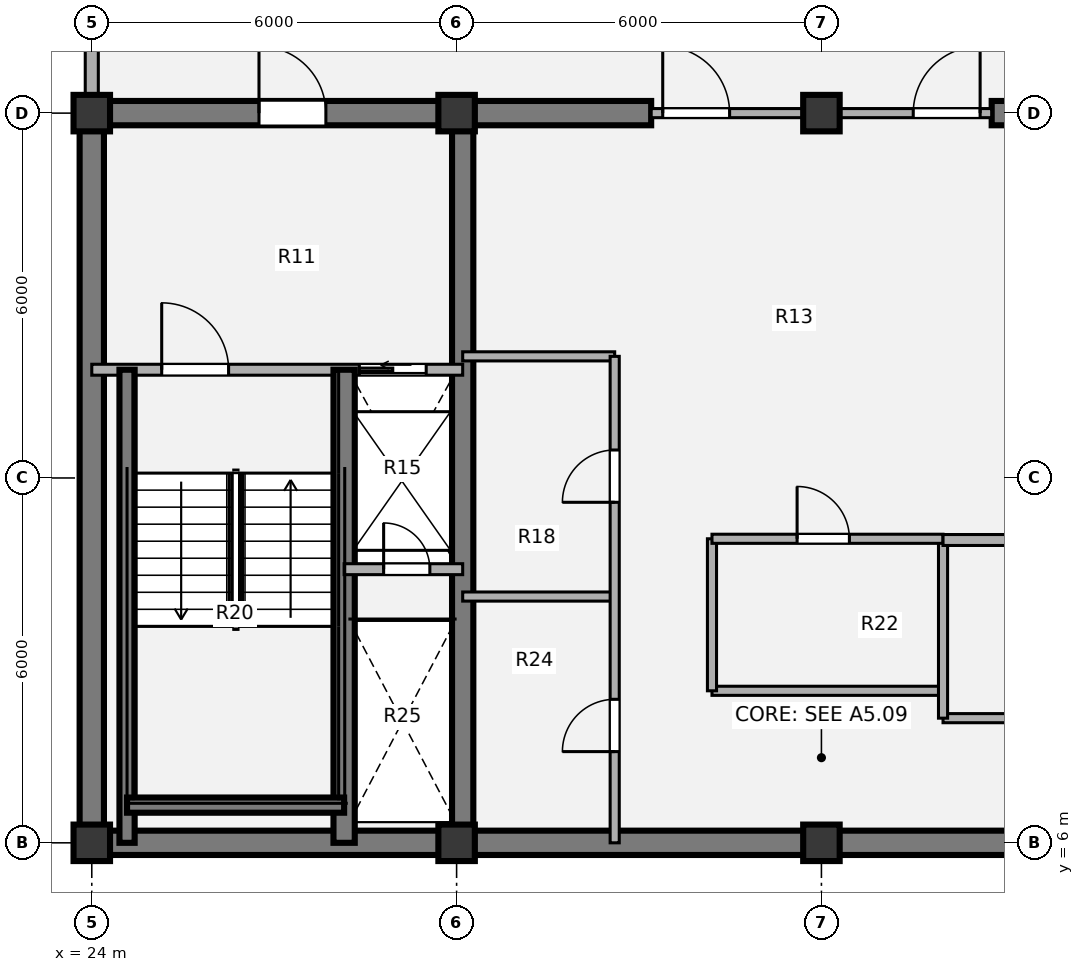
"""IFC4 building model, lengths in metres.
Left out: names, types, materials, properties, quantities, classifications, styles, units other than length and angle.
Written with IfcOpenShell. Run it as: python <this file> out.ifc"""

import sys

from ifc_helpers import new_model, si_unit, direction, frame, frame_2d, origin, origin_2d, place, context, subcontext, project, spatial, rectangle, extrude, source, transform, mapped, element, fill, save


model = new_model("IFC4")
c1 = context("Model", 3, precision=1e-05, world=origin(), true_north=direction((0.0, 1.0)))
c2 = subcontext(c1, "Body", "Model", "MODEL_VIEW")
j1 = project(units=[si_unit("LENGTHUNIT", "METRE"), si_unit("PLANEANGLEUNIT", "RADIAN")], contexts=[c1])
p1 = place(None, origin())
s1 = spatial("IfcSite", under=j1, at=p1, CompositionType="ELEMENT")
p2 = place(p1, origin())
s2 = spatial("IfcBuilding", under=s1, at=p2, CompositionType="ELEMENT")
p3 = place(p2, frame((0.0, 0.0, 257.04)))
s3 = spatial("IfcBuildingStorey", under=s2, at=p3, CompositionType="ELEMENT", Elevation=257.04)
m1 = source(origin(), c2, "Body", "SweptSolid", [
    extrude(rectangle(XDim=0.6, YDim=0.6, at=origin_2d()), origin(), (0.0, 0.0, 1.0), 3.78),
])
for number, where, z_axis, x_axis in (
    (1, (24.0, 6.0, 0.0), (0.0, 0.0, 1.0), (1.0, 0.0, 0.0)),
    (2, (30.0, 6.0, 0.0), (0.0, 0.0, 1.0), (1.0, 0.0, 0.0)),
    (3, (36.0, 6.0, 0.0), (0.0, 0.0, 1.0), (1.0, 0.0, 0.0)),
    (4, (24.0, 18.0, 0.0), (0.0, 0.0, 1.0), (1.0, 0.0, 0.0)),
    (5, (30.0, 18.0, 0.0), (0.0, 0.0, 1.0), (1.0, 0.0, 0.0)),
    (6, (36.0, 18.0, 0.0), (0.0, 0.0, 1.0), (1.0, 0.0, 0.0)),
):
    element("IfcColumn", number, at=place(p3, frame(where, z_axis=z_axis, x_axis=x_axis)), inside=s3, PredefinedType="COLUMN", context=c2, shape_type="MappedRepresentation", body=[
        mapped(m1, transform((0.0, 0.0, 0.0), x_axis=(1.0, 0.0, 0.0), y_axis=(0.0, 1.0, 0.0), z_axis=(0.0, 0.0, 1.0), scale=1.0)),
    ])
p4 = place(p3, frame((48.2, 6.0, 0.0), z_axis=(0.0, 0.0, 1.0), x_axis=(-1.0, 0.0, 0.0)))
e7 = element("IfcWall", 7, at=p4, inside=s3, PredefinedType="SHEAR", context=c2, shape_type="SweptSolid", body=[
    extrude(rectangle(XDim=24.4, YDim=0.4, at=frame_2d((12.2, 0.0))), origin(), (0.0, 0.0, 1.0), 3.78),
])
p5 = place(p3, frame((24.0, 6.0, 0.0), z_axis=(0.0, 0.0, 1.0), x_axis=(0.0, 1.0, 0.0)))
e8 = element("IfcWall", 8, at=p5, inside=s3, PredefinedType="SHEAR", context=c2, shape_type="SweptSolid", body=[
    extrude(rectangle(XDim=12.0, YDim=0.4, at=frame_2d((6.0, 0.0))), origin(), (0.0, 0.0, 1.0), 3.78),
])
p6 = place(p3, frame((23.8, 18.0, 0.0), z_axis=(0.0, 0.0, 1.0), x_axis=(1.0, 0.0, 0.0)))
e9 = element("IfcWall", 9, at=p6, inside=s3, PredefinedType="SHEAR", context=c2, shape_type="SweptSolid", body=[
    extrude(rectangle(XDim=9.4, YDim=0.4, at=frame_2d((4.7, 0.0))), origin(), (0.0, 0.0, 1.0), 3.78),
])
p7 = place(p6, frame((2.95, 0.0, 0.0)))
e10 = element("IfcOpeningElement", 10, at=p7, cuts=e9, PredefinedType="OPENING", context=c2, shape_type="SweptSolid", body=[
    extrude(rectangle(XDim=1.1, YDim=2.1, at=origin_2d()), frame((0.55, 0.21, 1.05), z_axis=(0.0, -1.0, 0.0), x_axis=(1.0, 0.0, 0.0)), (0.0, 0.0, 1.0), 0.42),
])
p8 = place(p3, frame((38.8, 18.0, 0.0), z_axis=(0.0, 0.0, 1.0), x_axis=(1.0, 0.0, 0.0)))
e11 = element("IfcWall", 11, at=p8, inside=s3, PredefinedType="SHEAR", context=c2, shape_type="SweptSolid", body=[
    extrude(rectangle(XDim=9.4, YDim=0.4, at=frame_2d((4.7, 0.0))), origin(), (0.0, 0.0, 1.0), 3.78),
])
p9 = place(p8, frame((5.45, 0.0, 0.0)))
e12 = element("IfcOpeningElement", 12, at=p9, cuts=e11, PredefinedType="OPENING", context=c2, shape_type="SweptSolid", body=[
    extrude(rectangle(XDim=1.1, YDim=2.1, at=origin_2d()), frame((0.55, 0.21, 1.05), z_axis=(0.0, -1.0, 0.0), x_axis=(1.0, 0.0, 0.0)), (0.0, 0.0, 1.0), 0.42),
])
p10 = place(p3, frame((30.1, 6.0, 0.0), z_axis=(0.0, 0.0, 1.0), x_axis=(0.0, 1.0, 0.0)))
e13 = element("IfcWall", 13, at=p10, inside=s3, PredefinedType="SHEAR", context=c2, shape_type="SweptSolid", body=[
    extrude(rectangle(XDim=12.0, YDim=0.35, at=frame_2d((6.0, 0.0))), origin(), (0.0, 0.0, 1.0), 3.78),
])
p11 = place(p3, frame((24.0, 18.28, 0.0), z_axis=(0.0, 0.0, 1.0), x_axis=(0.0, 1.0, 0.0)))
e14 = element("IfcWall", 14, at=p11, inside=s3, PredefinedType="SOLIDWALL", context=c2, shape_type="SweptSolid", body=[
    extrude(rectangle(XDim=2.77, YDim=0.215, at=frame_2d((1.385, 0.0))), origin(), (0.0, 0.0, 1.0), 2.718),
])
p12 = place(p3, frame((30.1, 14.0, 0.0), z_axis=(0.0, 0.0, 1.0), x_axis=(1.0, 0.0, 0.0)))
e15 = element("IfcWall", 15, at=p12, inside=s3, PredefinedType="PARTITIONING", context=c2, shape_type="SweptSolid", body=[
    extrude(rectangle(XDim=2.5, YDim=0.15, at=frame_2d((1.25, 0.0))), origin(), (0.0, 0.0, 1.0), 3.5),
])
p13 = place(p3, frame((34.2, 8.5, 0.0), z_axis=(0.0, 0.0, 1.0), x_axis=(1.0, 0.0, 0.0)))
e16 = element("IfcWall", 16, at=p13, inside=s3, PredefinedType="PARTITIONING", context=c2, shape_type="SweptSolid", body=[
    extrude(rectangle(XDim=3.8, YDim=0.15, at=frame_2d((1.9, 0.0))), origin(), (0.0, 0.0, 1.0), 3.5),
])
p14 = place(p3, frame((38.0, 8.05, 0.0), z_axis=(0.0, 0.0, 1.0), x_axis=(1.0, 0.0, 0.0)))
e17 = element("IfcWall", 17, at=p14, inside=s3, PredefinedType="PARTITIONING", context=c2, shape_type="SweptSolid", body=[
    extrude(rectangle(XDim=3.9, YDim=0.15, at=frame_2d((1.95, 0.0))), origin(), (0.0, 0.0, 1.0), 3.5),
])
p15 = place(p14, frame((1.45, 0.0, 0.0)))
e18 = element("IfcOpeningElement", 18, at=p15, cuts=e17, PredefinedType="OPENING", context=c2, shape_type="SweptSolid", body=[
    extrude(rectangle(XDim=0.86, YDim=2.1, at=origin_2d()), frame((0.43, 0.085, 1.05), z_axis=(0.0, -1.0, 0.0), x_axis=(1.0, 0.0, 0.0)), (0.0, 0.0, 1.0), 0.17),
])
p16 = place(p3, frame((34.2, 8.5, 0.0), z_axis=(0.0, 0.0, 1.0), x_axis=(0.0, 1.0, 0.0)))
e19 = element("IfcWall", 19, at=p16, inside=s3, PredefinedType="PARTITIONING", context=c2, shape_type="SweptSolid", body=[
    extrude(rectangle(XDim=2.5, YDim=0.15, at=frame_2d((1.25, 0.0))), origin(), (0.0, 0.0, 1.0), 3.5),
])
p17 = place(p3, frame((38.0, 8.05, 0.0), z_axis=(0.0, 0.0, 1.0), x_axis=(0.0, 1.0, 0.0)))
e20 = element("IfcWall", 20, at=p17, inside=s3, PredefinedType="PARTITIONING", context=c2, shape_type="SweptSolid", body=[
    extrude(rectangle(XDim=2.95, YDim=0.15, at=frame_2d((1.475, 0.0))), origin(), (0.0, 0.0, 1.0), 3.5),
])
p18 = place(p3, frame((34.2, 11.0, 0.0), z_axis=(0.0, 0.0, 1.0), x_axis=(1.0, 0.0, 0.0)))
e21 = element("IfcWall", 21, at=p18, inside=s3, PredefinedType="PARTITIONING", context=c2, shape_type="SweptSolid", body=[
    extrude(rectangle(XDim=3.8, YDim=0.15, at=frame_2d((1.9, 0.0))), origin(), (0.0, 0.0, 1.0), 3.5),
])
p19 = place(p18, frame((1.4, 0.0, 0.0)))
e22 = element("IfcOpeningElement", 22, at=p19, cuts=e21, PredefinedType="OPENING", context=c2, shape_type="SweptSolid", body=[
    extrude(rectangle(XDim=0.86, YDim=2.1, at=origin_2d()), frame((0.43, 0.085, 1.05), z_axis=(0.0, -1.0, 0.0), x_axis=(1.0, 0.0, 0.0)), (0.0, 0.0, 1.0), 0.17),
])
p20 = place(p3, frame((38.0, 10.98, 0.0), z_axis=(0.0, 0.0, 1.0), x_axis=(1.0, 0.0, 0.0)))
e23 = element("IfcWall", 23, at=p20, inside=s3, PredefinedType="PARTITIONING", context=c2, shape_type="SweptSolid", body=[
    extrude(rectangle(XDim=3.9, YDim=0.18, at=frame_2d((1.95, 0.0))), origin(), (0.0, 0.0, 1.0), 3.5),
])
p21 = place(p3, frame((30.1, 10.05, 0.0), z_axis=(0.0, 0.0, 1.0), x_axis=(1.0, 0.0, 0.0)))
e24 = element("IfcWall", 24, at=p21, inside=s3, PredefinedType="PARTITIONING", context=c2, shape_type="SweptSolid", body=[
    extrude(rectangle(XDim=2.5, YDim=0.15, at=frame_2d((1.25, 0.0))), origin(), (0.0, 0.0, 1.0), 3.5),
])
p22 = place(p3, frame((32.6, 6.0, 0.0), z_axis=(0.0, 0.0, 1.0), x_axis=(0.0, 1.0, 0.0)))
e25 = element("IfcWall", 25, at=p22, inside=s3, PredefinedType="PARTITIONING", context=c2, shape_type="SweptSolid", body=[
    extrude(rectangle(XDim=8.0, YDim=0.15, at=frame_2d((4.0, 0.0))), origin(), (0.0, 0.0, 1.0), 3.5),
])
p23 = place(p22, frame((1.5, 0.0, 0.0)))
e26 = element("IfcOpeningElement", 26, at=p23, cuts=e25, PredefinedType="OPENING", context=c2, shape_type="SweptSolid", body=[
    extrude(rectangle(XDim=0.86, YDim=2.1, at=origin_2d()), frame((0.43, 0.085, 1.05), z_axis=(0.0, -1.0, 0.0), x_axis=(1.0, 0.0, 0.0)), (0.0, 0.0, 1.0), 0.17),
])
p24 = place(p22, frame((5.6, 0.0, 0.0)))
e27 = element("IfcOpeningElement", 27, at=p24, cuts=e25, PredefinedType="OPENING", context=c2, shape_type="SweptSolid", body=[
    extrude(rectangle(XDim=0.86, YDim=2.1, at=origin_2d()), frame((0.43, 0.085, 1.05), z_axis=(0.0, -1.0, 0.0), x_axis=(1.0, 0.0, 0.0)), (0.0, 0.0, 1.0), 0.17),
])
p25 = place(p3, frame((33.2, 18.0, 0.0), z_axis=(0.0, 0.0, 1.0), x_axis=(1.0, 0.0, 0.0)))
e28 = element("IfcWall", 28, at=p25, inside=s3, PredefinedType="PARTITIONING", context=c2, shape_type="SweptSolid", body=[
    extrude(rectangle(XDim=5.6, YDim=0.15, at=frame_2d((2.8, 0.0))), origin(), (0.0, 0.0, 1.0), 2.515),
])
p26 = place(p25, frame((0.19, 0.0, 0.0)))
e29 = element("IfcOpeningElement", 29, at=p26, cuts=e28, PredefinedType="OPENING", context=c2, shape_type="SweptSolid", body=[
    extrude(rectangle(XDim=1.1, YDim=2.1, at=origin_2d()), frame((0.55, 0.085, 1.05), z_axis=(0.0, -1.0, 0.0), x_axis=(1.0, 0.0, 0.0)), (0.0, 0.0, 1.0), 0.17),
])
p27 = place(p25, frame((4.31, 0.0, 0.0)))
e30 = element("IfcOpeningElement", 30, at=p27, cuts=e28, PredefinedType="OPENING", context=c2, shape_type="SweptSolid", body=[
    extrude(rectangle(XDim=1.1, YDim=2.1, at=origin_2d()), frame((0.55, 0.085, 1.05), z_axis=(0.0, -1.0, 0.0), x_axis=(1.0, 0.0, 0.0)), (0.0, 0.0, 1.0), 0.17),
])
p28 = place(p3, frame((24.0, 13.78, 0.0), z_axis=(0.0, 0.0, 1.0), x_axis=(1.0, 0.0, 0.0)))
e31 = element("IfcWall", 31, at=p28, inside=s3, PredefinedType="PARTITIONING", context=c2, shape_type="SweptSolid", body=[
    extrude(rectangle(XDim=6.1, YDim=0.18, at=frame_2d((3.05, 0.0))), origin(), (0.0, 0.0, 1.0), 3.5),
])
p29 = place(p28, frame((1.15, 0.0, 0.0)))
e32 = element("IfcOpeningElement", 32, at=p29, cuts=e31, PredefinedType="OPENING", context=c2, shape_type="SweptSolid", body=[
    extrude(rectangle(XDim=1.1, YDim=2.1, at=origin_2d()), frame((0.55, 0.1, 1.05), z_axis=(0.0, -1.0, 0.0), x_axis=(1.0, 0.0, 0.0)), (0.0, 0.0, 1.0), 0.2),
])
p30 = place(p28, frame((4.4, 0.0, 0.0)))
e33 = element("IfcOpeningElement", 33, at=p30, cuts=e31, PredefinedType="OPENING", context=c2, shape_type="SweptSolid", body=[
    extrude(rectangle(XDim=1.1, YDim=2.1, at=origin_2d()), frame((0.55, 0.1, 1.05), z_axis=(0.0, -1.0, 0.0), x_axis=(1.0, 0.0, 0.0)), (0.0, 0.0, 1.0), 0.2),
])
p31 = place(p3, frame((28.15, 6.0, 0.0), z_axis=(0.0, 0.0, 1.0), x_axis=(0.0, 1.0, 0.0)))
e34 = element("IfcWall", 34, at=p31, inside=s3, PredefinedType="SHEAR", context=c2, shape_type="SweptSolid", body=[
    extrude(rectangle(XDim=7.78, YDim=0.35, at=frame_2d((3.89, 0.0))), origin(), (0.0, 0.0, 1.0), 3.85),
])
p32 = place(p3, frame((24.58, 6.0, 0.0), z_axis=(0.0, 0.0, 1.0), x_axis=(0.0, 1.0, 0.0)))
e35 = element("IfcWall", 35, at=p32, inside=s3, PredefinedType="SHEAR", context=c2, shape_type="SweptSolid", body=[
    extrude(rectangle(XDim=7.78, YDim=0.25, at=frame_2d((3.89, 0.0))), origin(), (0.0, 0.0, 1.0), 3.85),
])
p33 = place(p3, frame((24.58, 6.62, 0.0), z_axis=(0.0, 0.0, 1.0), x_axis=(1.0, 0.0, 0.0)))
e36 = element("IfcWall", 36, at=p33, inside=s3, PredefinedType="SHEAR", context=c2, shape_type="SweptSolid", body=[
    extrude(rectangle(XDim=3.57, YDim=0.25, at=frame_2d((1.785, 0.0))), origin(), (0.0, 0.0, 1.0), 3.85),
])
p34 = place(p3, frame((28.15, 10.5, 0.0), z_axis=(0.0, 0.0, 1.0), x_axis=(1.0, 0.0, 0.0)))
e37 = element("IfcWall", 37, at=p34, inside=s3, PredefinedType="PARTITIONING", context=c2, shape_type="SweptSolid", body=[
    extrude(rectangle(XDim=1.95, YDim=0.18, at=frame_2d((0.975, 0.0))), origin(), (0.0, 0.0, 1.0), 3.5),
])
p35 = place(p34, frame((0.65, 0.0, 0.0)))
e38 = element("IfcOpeningElement", 38, at=p35, cuts=e37, PredefinedType="OPENING", context=c2, shape_type="SweptSolid", body=[
    extrude(rectangle(XDim=0.76, YDim=2.05, at=origin_2d()), frame((0.38, 0.1, 1.025), z_axis=(0.0, -1.0, 0.0), x_axis=(1.0, 0.0, 0.0)), (0.0, 0.0, 1.0), 0.2),
])
m2 = source(origin(), c2, "Body", "SweptSolid", [
    extrude(rectangle(XDim=0.86, YDim=2.1, at=origin_2d()), frame((0.43, 0.025, 1.05), z_axis=(0.0, -1.0, 0.0), x_axis=(1.0, 0.0, 0.0)), (0.0, 0.0, 1.0), 0.05),
])
p36 = place(p19, origin())
e39 = element("IfcDoor", 39, at=p36, inside=s3, OperationType="SINGLE_SWING_LEFT", PredefinedType="DOOR", context=c2, shape_type="MappedRepresentation", body=[
    mapped(m2, transform((0.0, 0.0, 0.0), x_axis=(1.0, 0.0, 0.0), y_axis=(0.0, 1.0, 0.0), z_axis=(0.0, 0.0, 1.0), scale=1.0)),
])
fill(e22, e39)
p37 = place(p23, origin())
e40 = element("IfcDoor", 40, at=p37, inside=s3, OperationType="SINGLE_SWING_LEFT", PredefinedType="DOOR", context=c2, shape_type="MappedRepresentation", body=[
    mapped(m2, transform((0.0, 0.0, 0.0), x_axis=(1.0, 0.0, 0.0), y_axis=(0.0, 1.0, 0.0), z_axis=(0.0, 0.0, 1.0), scale=1.0)),
])
fill(e26, e40)
p38 = place(p24, origin())
e41 = element("IfcDoor", 41, at=p38, inside=s3, OperationType="SINGLE_SWING_LEFT", PredefinedType="DOOR", context=c2, shape_type="MappedRepresentation", body=[
    mapped(m2, transform((0.0, 0.0, 0.0), x_axis=(1.0, 0.0, 0.0), y_axis=(0.0, 1.0, 0.0), z_axis=(0.0, 0.0, 1.0), scale=1.0)),
])
fill(e27, e41)
m3 = source(origin(), c2, "Body", "SweptSolid", [
    extrude(rectangle(XDim=1.1, YDim=2.1, at=origin_2d()), frame((0.55, 0.025, 1.05), z_axis=(0.0, -1.0, 0.0), x_axis=(1.0, 0.0, 0.0)), (0.0, 0.0, 1.0), 0.05),
])
p39 = place(p26, origin())
e42 = element("IfcDoor", 42, at=p39, inside=s3, OperationType="SINGLE_SWING_LEFT", PredefinedType="DOOR", context=c2, shape_type="MappedRepresentation", body=[
    mapped(m3, transform((0.0, 0.0, 0.0), x_axis=(1.0, 0.0, 0.0), y_axis=(0.0, 1.0, 0.0), z_axis=(0.0, 0.0, 1.0), scale=1.0)),
])
fill(e29, e42)
p40 = place(p27, origin())
e43 = element("IfcDoor", 43, at=p40, inside=s3, OperationType="SINGLE_SWING_RIGHT", PredefinedType="DOOR", context=c2, shape_type="MappedRepresentation", body=[
    mapped(m3, transform((0.0, 0.0, 0.0), x_axis=(1.0, 0.0, 0.0), y_axis=(0.0, 1.0, 0.0), z_axis=(0.0, 0.0, 1.0), scale=1.0)),
])
fill(e30, e43)
m4 = source(origin(), c2, "Body", "SweptSolid", [
    extrude(rectangle(XDim=1.1, YDim=2.1, at=origin_2d()), frame((0.55, 0.025, 1.05), z_axis=(0.0, -1.0, 0.0), x_axis=(1.0, 0.0, 0.0)), (0.0, 0.0, 1.0), 0.05),
])
p41 = place(p29, origin())
e44 = element("IfcDoor", 44, at=p41, inside=s3, OperationType="SINGLE_SWING_LEFT", PredefinedType="DOOR", context=c2, shape_type="MappedRepresentation", body=[
    mapped(m4, transform((0.0, 0.0, 0.0), x_axis=(1.0, 0.0, 0.0), y_axis=(0.0, 1.0, 0.0), z_axis=(0.0, 0.0, 1.0), scale=1.0)),
])
fill(e32, e44)
m5 = source(origin(), c2, "Body", "SweptSolid", [
    extrude(rectangle(XDim=1.1, YDim=2.1, at=origin_2d()), frame((0.55, 0.025, 1.05), z_axis=(0.0, -1.0, 0.0), x_axis=(1.0, 0.0, 0.0)), (0.0, 0.0, 1.0), 0.05),
])
p42 = place(p30, origin())
e45 = element("IfcDoor", 45, at=p42, inside=s3, OperationType="SLIDING_TO_LEFT", PredefinedType="DOOR", context=c2, shape_type="MappedRepresentation", body=[
    mapped(m5, transform((0.0, 0.0, 0.0), x_axis=(1.0, 0.0, 0.0), y_axis=(0.0, 1.0, 0.0), z_axis=(0.0, 0.0, 1.0), scale=1.0)),
])
fill(e33, e45)
m6 = source(origin(), c2, "Body", "SweptSolid", [
    extrude(rectangle(XDim=0.76, YDim=2.05, at=origin_2d()), frame((0.38, 0.025, 1.025), z_axis=(0.0, -1.0, 0.0), x_axis=(1.0, 0.0, 0.0)), (0.0, 0.0, 1.0), 0.05),
])
p43 = place(p35, origin())
e46 = element("IfcDoor", 46, at=p43, inside=s3, OperationType="SINGLE_SWING_LEFT", PredefinedType="DOOR", context=c2, shape_type="MappedRepresentation", body=[
    mapped(m6, transform((0.0, 0.0, 0.0), x_axis=(1.0, 0.0, 0.0), y_axis=(0.0, 1.0, 0.0), z_axis=(0.0, 0.0, 1.0), scale=1.0)),
])
fill(e38, e46)
p44 = place(p7, origin())
e47 = element("IfcDoor", 47, at=p44, inside=s3, OperationType="SINGLE_SWING_LEFT", PredefinedType="DOOR", context=c2, shape_type="MappedRepresentation", body=[
    mapped(m3, transform((0.0, 0.0, 0.0), x_axis=(1.0, 0.0, 0.0), y_axis=(0.0, 1.0, 0.0), z_axis=(0.0, 0.0, 1.0), scale=1.0)),
])
fill(e10, e47)
save(model, sys.argv[1])
